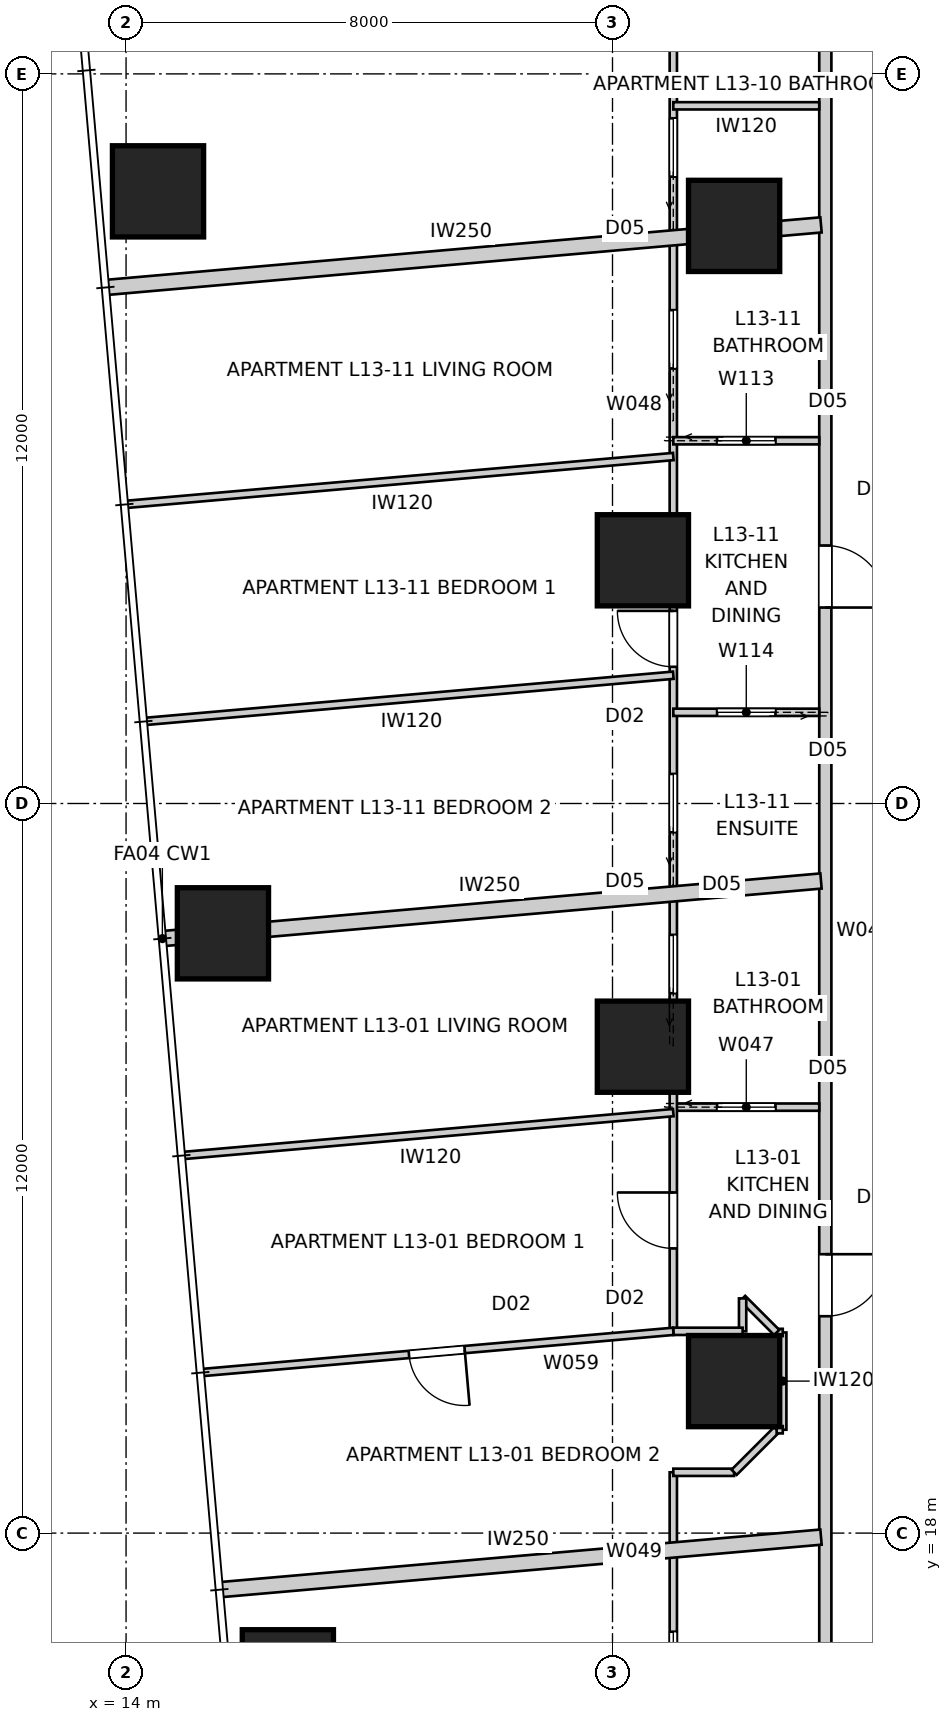
"""IFC4 building model, lengths in metres.
Left out: names, types, materials, properties, quantities, classifications, styles, units other than length and angle.
Written with IfcOpenShell. Run it as: python <this file> out.ifc"""

import sys

from ifc_helpers import new_model, si_unit, direction, frame, frame_2d, origin, origin_2d, place, context, subcontext, project, spatial, rectangle, extrude, element, fill, save


model = new_model("IFC4")
c1 = context("Model", 3, precision=1e-05, world=origin(), true_north=direction((0.0, 1.0)))
c2 = subcontext(c1, "Body", "Model", "MODEL_VIEW")
j1 = project(units=[si_unit("LENGTHUNIT", "METRE"), si_unit("PLANEANGLEUNIT", "RADIAN")], contexts=[c1])
p1 = place(None, origin())
s1 = spatial("IfcSite", under=j1, at=p1, CompositionType="ELEMENT")
p2 = place(p1, origin())
s2 = spatial("IfcBuilding", under=s1, at=p2, CompositionType="ELEMENT")
p3 = place(p2, frame((0.0, 0.0, 50.6)))
s3 = spatial("IfcBuildingStorey", under=s2, at=p3, CompositionType="ELEMENT", Elevation=50.6)
for number, where, z_axis, x_axis in (
    (1, (14.526, 40.068, 0.0), (0.0, 0.0, 1.0), (1.0, 0.0, 0.0)),
    (2, (15.593, 27.865, 0.0), (0.0, 0.0, 1.0), (1.0, 0.0, 0.0)),
    (3, (16.661, 15.661, 0.0), (0.0, 0.0, 1.0), (1.0, 0.0, 0.0)),
    (4, (24.0, 39.5, 0.0), (0.0, 0.0, 1.0), (1.0, 0.0, 0.0)),
    (5, (22.5, 34.0, 0.0), (0.0, 0.0, 1.0), (1.0, 0.0, 0.0)),
    (6, (22.5, 26.0, 0.0), (0.0, 0.0, 1.0), (1.0, 0.0, 0.0)),
    (7, (24.0, 20.5, 0.0), (0.0, 0.0, 1.0), (1.0, 0.0, 0.0)),
):
    element("IfcColumn", number, at=place(p3, frame(where, z_axis=z_axis, x_axis=x_axis)), inside=s3, PredefinedType="COLUMN", context=c2, shape_type="SweptSolid", body=[
        extrude(rectangle(XDim=1.5, YDim=1.5, at=origin_2d()), origin(), (0.0, 0.0, 1.0), 3.4),
    ])
p4 = place(p3, frame((25.5, 43.7, 0.0), z_axis=(0.0, 0.0, 1.0), x_axis=(0.0, -1.0, 0.0)))
e8 = element("IfcWall", 8, at=p4, inside=s3, PredefinedType="PARTITIONING", context=c2, shape_type="SweptSolid", body=[
    extrude(rectangle(XDim=28.2, YDim=0.2, at=frame_2d((14.1, 0.0))), origin(), (0.0, 0.0, 1.0), 3.25),
])
p5 = place(p4, frame((21.113, 0.0, 0.0)))
e9 = element("IfcOpeningElement", 9, at=p5, cuts=e8, PredefinedType="OPENING", context=c2, shape_type="SweptSolid", body=[
    extrude(rectangle(XDim=1.02, YDim=2.34, at=frame_2d((0.51, 1.17))), frame((0.0, 0.11, 0.0), z_axis=(0.0, -1.0, 0.0), x_axis=(1.0, 0.0, 0.0)), (0.0, 0.0, 1.0), 0.22),
])
p6 = place(p4, frame((9.457, 0.0, 0.0)))
e10 = element("IfcOpeningElement", 10, at=p6, cuts=e8, PredefinedType="OPENING", context=c2, shape_type="SweptSolid", body=[
    extrude(rectangle(XDim=1.02, YDim=2.34, at=frame_2d((0.51, 1.17))), frame((0.0, 0.11, 0.0), z_axis=(0.0, -1.0, 0.0), x_axis=(1.0, 0.0, 0.0)), (0.0, 0.0, 1.0), 0.22),
])
p7 = place(p3, frame((13.66, 38.487, 0.0), z_axis=(0.0, 0.0, 1.0), x_axis=(0.996193605338, 0.087168232078, 0.0)))
e11 = element("IfcWall", 11, at=p7, inside=s3, PredefinedType="PARTITIONING", context=c2, shape_type="SweptSolid", body=[
    extrude(rectangle(XDim=11.814, YDim=0.25, at=frame_2d((5.907, 0.0))), origin(), (0.0, 0.0, 1.0), 3.25),
])
p8 = place(p3, frame((15.534, 17.068, 0.0), z_axis=(0.0, 0.0, 1.0), x_axis=(0.996194517831, 0.087157803114, 0.0)))
e12 = element("IfcWall", 12, at=p8, inside=s3, PredefinedType="PARTITIONING", context=c2, shape_type="SweptSolid", body=[
    extrude(rectangle(XDim=9.933, YDim=0.25, at=frame_2d((4.966, 0.0))), origin(), (0.0, 0.0, 1.0), 3.25),
])
p9 = place(p3, frame((14.597, 27.778, 0.0), z_axis=(0.0, 0.0, 1.0), x_axis=(0.996196056792, 0.087140211333, 0.0)))
e13 = element("IfcWall", 13, at=p9, inside=s3, PredefinedType="PARTITIONING", context=c2, shape_type="SweptSolid", body=[
    extrude(rectangle(XDim=10.873, YDim=0.25, at=frame_2d((5.437, 0.0))), origin(), (0.0, 0.0, 1.0), 3.25),
])
p10 = place(p3, frame((23.0, 25.006, 0.0), z_axis=(0.0, 0.0, 1.0), x_axis=(1.0, 0.0, 0.0)))
e14 = element("IfcWall", 14, at=p10, inside=s3, PredefinedType="PARTITIONING", context=c2, shape_type="SweptSolid", body=[
    extrude(rectangle(XDim=2.4, YDim=0.12, at=frame_2d((1.2, 0.0))), origin(), (0.0, 0.0, 1.0), 3.25),
])
p11 = place(p10, frame((0.72, 0.0, 0.0)))
e15 = element("IfcOpeningElement", 15, at=p11, cuts=e14, PredefinedType="OPENING", context=c2, shape_type="SweptSolid", body=[
    extrude(rectangle(XDim=0.96, YDim=2.1, at=frame_2d((0.48, 1.05))), frame((0.0, 0.07, 0.0), z_axis=(0.0, -1.0, 0.0), x_axis=(1.0, 0.0, 0.0)), (0.0, 0.0, 1.0), 0.14),
])
p12 = place(p3, frame((23.0, 21.319, 0.0), z_axis=(0.0, 0.0, 1.0), x_axis=(0.0, 1.0, 0.0)))
e16 = element("IfcWall", 16, at=p12, inside=s3, PredefinedType="PARTITIONING", context=c2, shape_type="SweptSolid", body=[
    extrude(rectangle(XDim=25.681, YDim=0.12, at=frame_2d((12.841, 0.0))), origin(), (0.0, 0.0, 1.0), 2.55),
])
p13 = place(p12, frame((1.364, 0.0, 0.0)))
e17 = element("IfcOpeningElement", 17, at=p13, cuts=e16, PredefinedType="OPENING", context=c2, shape_type="SweptSolid", body=[
    extrude(rectangle(XDim=0.92, YDim=2.34, at=frame_2d((0.46, 1.17))), frame((0.0, 0.07, 0.0), z_axis=(0.0, -1.0, 0.0), x_axis=(1.0, 0.0, 0.0)), (0.0, 0.0, 1.0), 0.14),
])
p14 = place(p12, frame((10.93, 0.0, 0.0)))
e18 = element("IfcOpeningElement", 18, at=p14, cuts=e16, PredefinedType="OPENING", context=c2, shape_type="SweptSolid", body=[
    extrude(rectangle(XDim=0.92, YDim=2.34, at=frame_2d((0.46, 1.17))), frame((0.0, 0.07, 0.0), z_axis=(0.0, -1.0, 0.0), x_axis=(1.0, 0.0, 0.0)), (0.0, 0.0, 1.0), 0.14),
])
p15 = place(p12, frame((22.233, 0.0, 0.0)))
e19 = element("IfcOpeningElement", 19, at=p15, cuts=e16, PredefinedType="OPENING", context=c2, shape_type="SweptSolid", body=[
    extrude(rectangle(XDim=0.92, YDim=2.34, at=frame_2d((0.46, 1.17))), frame((0.0, 0.07, 0.0), z_axis=(0.0, -1.0, 0.0), x_axis=(1.0, 0.0, 0.0)), (0.0, 0.0, 1.0), 0.14),
])
p16 = place(p12, frame((18.991, 0.0, 0.0)))
e20 = element("IfcOpeningElement", 20, at=p16, cuts=e16, PredefinedType="OPENING", context=c2, shape_type="SweptSolid", body=[
    extrude(rectangle(XDim=0.96, YDim=2.1, at=frame_2d((0.48, 1.05))), frame((0.0, 0.07, 0.0), z_axis=(0.0, -1.0, 0.0), x_axis=(1.0, 0.0, 0.0)), (0.0, 0.0, 1.0), 0.14),
])
p17 = place(p12, frame((5.561, 0.0, 0.0)))
e21 = element("IfcOpeningElement", 21, at=p17, cuts=e16, PredefinedType="OPENING", context=c2, shape_type="SweptSolid", body=[
    extrude(rectangle(XDim=0.96, YDim=2.1, at=frame_2d((0.48, 1.05))), frame((0.0, 0.07, 0.0), z_axis=(0.0, -1.0, 0.0), x_axis=(1.0, 0.0, 0.0)), (0.0, 0.0, 1.0), 0.14),
])
p18 = place(p12, frame((15.836, 0.0, 0.0)))
e22 = element("IfcOpeningElement", 22, at=p18, cuts=e16, PredefinedType="OPENING", context=c2, shape_type="SweptSolid", body=[
    extrude(rectangle(XDim=0.96, YDim=2.1, at=frame_2d((0.48, 1.05))), frame((0.0, 0.07, 0.0), z_axis=(0.0, -1.0, 0.0), x_axis=(1.0, 0.0, 0.0)), (0.0, 0.0, 1.0), 0.14),
])
p19 = place(p12, frame((8.208, 0.0, 0.0)))
e23 = element("IfcOpeningElement", 23, at=p19, cuts=e16, PredefinedType="OPENING", context=c2, shape_type="SweptSolid", body=[
    extrude(rectangle(XDim=0.96, YDim=2.1, at=frame_2d((0.48, 1.05))), frame((0.0, 0.07, 0.0), z_axis=(0.0, -1.0, 0.0), x_axis=(1.0, 0.0, 0.0)), (0.0, 0.0, 1.0), 0.14),
])
p20 = place(p3, frame((23.0, 13.0, 0.0), z_axis=(0.0, 0.0, 1.0), x_axis=(0.0, 1.0, 0.0)))
e24 = element("IfcWall", 24, at=p20, inside=s3, PredefinedType="PARTITIONING", context=c2, shape_type="SweptSolid", body=[
    extrude(rectangle(XDim=6.0, YDim=0.12, at=frame_2d((3.0, 0.0))), origin(), (0.0, 0.0, 1.0), 3.25),
])
p21 = place(p20, frame((2.418, 0.0, 0.0)))
e25 = element("IfcOpeningElement", 25, at=p21, cuts=e24, PredefinedType="OPENING", context=c2, shape_type="SweptSolid", body=[
    extrude(rectangle(XDim=0.96, YDim=2.1, at=frame_2d((0.48, 1.05))), frame((0.0, 0.07, 0.0), z_axis=(0.0, -1.0, 0.0), x_axis=(1.0, 0.0, 0.0)), (0.0, 0.0, 1.0), 0.14),
])
p22 = place(p3, frame((23.0, 19.0, 0.0), z_axis=(0.0, 0.0, 1.0), x_axis=(1.0, 0.0, 0.0)))
e26 = element("IfcWall", 26, at=p22, inside=s3, PredefinedType="PARTITIONING", context=c2, shape_type="SweptSolid", body=[
    extrude(rectangle(XDim=1.0, YDim=0.12, at=frame_2d((0.5, 0.0))), origin(), (0.0, 0.0, 1.0), 3.25),
])
p23 = place(p3, frame((24.0, 19.0, 0.0), z_axis=(0.0, 0.0, 1.0), x_axis=(0.707106781187, 0.707106781187, 0.0)))
e27 = element("IfcWall", 27, at=p23, inside=s3, PredefinedType="PARTITIONING", context=c2, shape_type="SweptSolid", body=[
    extrude(rectangle(XDim=0.99, YDim=0.12, at=frame_2d((0.495, 0.0))), origin(), (0.0, 0.0, 1.0), 3.25),
])
p24 = place(p3, frame((24.8, 19.7, 0.0), z_axis=(0.0, 0.0, 1.0), x_axis=(0.0, 1.0, 0.0)))
e28 = element("IfcWall", 28, at=p24, inside=s3, PredefinedType="PARTITIONING", context=c2, shape_type="SweptSolid", body=[
    extrude(rectangle(XDim=1.6, YDim=0.12, at=frame_2d((0.8, 0.0))), origin(), (0.0, 0.0, 1.0), 3.25),
])
p25 = place(p3, frame((24.7, 21.3, 0.0), z_axis=(0.0, 0.0, 1.0), x_axis=(-0.707106781187, 0.707106781187, 0.0)))
e29 = element("IfcWall", 29, at=p25, inside=s3, PredefinedType="PARTITIONING", context=c2, shape_type="SweptSolid", body=[
    extrude(rectangle(XDim=0.792, YDim=0.12, at=frame_2d((0.396, 0.0))), origin(), (0.0, 0.0, 1.0), 3.25),
])
p26 = place(p3, frame((24.14, 21.86, 0.0), z_axis=(0.0, 0.0, 1.0), x_axis=(0.0, -1.0, 0.0)))
e30 = element("IfcWall", 30, at=p26, inside=s3, PredefinedType="PARTITIONING", context=c2, shape_type="SweptSolid", body=[
    extrude(rectangle(XDim=0.542, YDim=0.12, at=frame_2d((0.271, 0.0))), origin(), (0.0, 0.0, 1.0), 3.25),
])
p27 = place(p3, frame((24.14, 21.319, 0.0), z_axis=(0.0, 0.0, 1.0), x_axis=(-1.0, 0.0, 0.0)))
e31 = element("IfcWall", 31, at=p27, inside=s3, PredefinedType="PARTITIONING", context=c2, shape_type="SweptSolid", body=[
    extrude(rectangle(XDim=1.14, YDim=0.12, at=frame_2d((0.57, 0.0))), origin(), (0.0, 0.0, 1.0), 3.25),
])
p28 = place(p3, frame((23.0, 24.916, 0.0), z_axis=(0.0, 0.0, 1.0), x_axis=(-0.99619214338, -0.087184938313, 0.0)))
e32 = element("IfcWall", 32, at=p28, inside=s3, PredefinedType="PARTITIONING", context=c2, shape_type="SweptSolid", body=[
    extrude(rectangle(XDim=8.082, YDim=0.12, at=frame_2d((4.041, 0.0))), origin(), (0.0, 0.0, 1.0), 3.25),
])
p29 = place(p3, frame((23.0, 21.319, 0.0), z_axis=(0.0, 0.0, 1.0), x_axis=(-0.996195047824, -0.0871517452, 0.0)))
e33 = element("IfcWall", 33, at=p29, inside=s3, PredefinedType="PARTITIONING", context=c2, shape_type="SweptSolid", body=[
    extrude(rectangle(XDim=7.768, YDim=0.12, at=frame_2d((3.884, 0.0))), origin(), (0.0, 0.0, 1.0), 3.25),
])
p30 = place(p29, frame((3.444, 0.0, 0.0)))
e34 = element("IfcOpeningElement", 34, at=p30, cuts=e33, PredefinedType="OPENING", context=c2, shape_type="SweptSolid", body=[
    extrude(rectangle(XDim=0.92, YDim=2.34, at=frame_2d((0.46, 1.17))), frame((0.0, 0.07, 0.0), z_axis=(0.0, -1.0, 0.0), x_axis=(1.0, 0.0, 0.0)), (0.0, 0.0, 1.0), 0.14),
])
p31 = place(p3, frame((25.4, 41.475, 0.0), z_axis=(0.0, 0.0, 1.0), x_axis=(-1.0, 0.0, 0.0)))
e35 = element("IfcWall", 35, at=p31, inside=s3, PredefinedType="PARTITIONING", context=c2, shape_type="SweptSolid", body=[
    extrude(rectangle(XDim=2.4, YDim=0.12, at=frame_2d((1.2, 0.0))), origin(), (0.0, 0.0, 1.0), 3.25),
])
p32 = place(p3, frame((23.0, 35.966, 0.0), z_axis=(0.0, 0.0, 1.0), x_axis=(1.0, 0.0, 0.0)))
e36 = element("IfcWall", 36, at=p32, inside=s3, PredefinedType="PARTITIONING", context=c2, shape_type="SweptSolid", body=[
    extrude(rectangle(XDim=2.4, YDim=0.12, at=frame_2d((1.2, 0.0))), origin(), (0.0, 0.0, 1.0), 3.25),
])
p33 = place(p32, frame((0.72, 0.0, 0.0)))
e37 = element("IfcOpeningElement", 37, at=p33, cuts=e36, PredefinedType="OPENING", context=c2, shape_type="SweptSolid", body=[
    extrude(rectangle(XDim=0.96, YDim=2.1, at=frame_2d((0.48, 1.05))), frame((0.0, 0.07, 0.0), z_axis=(0.0, -1.0, 0.0), x_axis=(1.0, 0.0, 0.0)), (0.0, 0.0, 1.0), 0.14),
])
p34 = place(p3, frame((25.4, 31.5, 0.0), z_axis=(0.0, 0.0, 1.0), x_axis=(-1.0, 0.0, 0.0)))
e38 = element("IfcWall", 38, at=p34, inside=s3, PredefinedType="PARTITIONING", context=c2, shape_type="SweptSolid", body=[
    extrude(rectangle(XDim=2.4, YDim=0.12, at=frame_2d((1.2, 0.0))), origin(), (0.0, 0.0, 1.0), 3.25),
])
p35 = place(p34, frame((0.72, 0.0, 0.0)))
e39 = element("IfcOpeningElement", 39, at=p35, cuts=e38, PredefinedType="OPENING", context=c2, shape_type="SweptSolid", body=[
    extrude(rectangle(XDim=0.96, YDim=2.1, at=frame_2d((0.48, 1.05))), frame((0.0, 0.07, 0.0), z_axis=(0.0, -1.0, 0.0), x_axis=(1.0, 0.0, 0.0)), (0.0, 0.0, 1.0), 0.14),
])
p36 = place(p3, frame((23.0, 35.707, 0.0), z_axis=(0.0, 0.0, 1.0), x_axis=(-0.996194246178, -0.087160907995, 0.0)))
e40 = element("IfcWall", 40, at=p36, inside=s3, PredefinedType="PARTITIONING", context=c2, shape_type="SweptSolid", body=[
    extrude(rectangle(XDim=9.022, YDim=0.12, at=frame_2d((4.511, 0.0))), origin(), (0.0, 0.0, 1.0), 3.25),
])
p37 = place(p3, frame((23.0, 32.11, 0.0), z_axis=(0.0, 0.0, 1.0), x_axis=(-0.996194478193, -0.087158256162, 0.0)))
e41 = element("IfcWall", 41, at=p37, inside=s3, PredefinedType="PARTITIONING", context=c2, shape_type="SweptSolid", body=[
    extrude(rectangle(XDim=8.709, YDim=0.12, at=frame_2d((4.354, 0.0))), origin(), (0.0, 0.0, 1.0), 3.25),
])
for number, where, z_axis, x_axis in (
    (42, (24.8, 19.7, 0.0), (0.0, 0.0, 1.0), (-1.0, 0.0, 0.0)),
    (43, (24.8, 21.3, 0.0), (0.0, 0.0, 1.0), (-1.0, 0.0, 0.0)),
):
    element("IfcWall", number, at=place(p3, frame(where, z_axis=z_axis, x_axis=x_axis)), inside=s3, PredefinedType="PARTITIONING", context=c2, shape_type="SweptSolid", body=[
        extrude(rectangle(XDim=0.1, YDim=0.12, at=frame_2d((0.05, 0.0))), origin(), (0.0, 0.0, 1.0), 3.25),
    ])
p38 = place(p5, origin())
e44 = element("IfcDoor", 44, at=p38, inside=s3, OperationType="SINGLE_SWING_LEFT", PredefinedType="DOOR", context=c2, shape_type="SweptSolid", body=[
    extrude(rectangle(XDim=1.02, YDim=2.34, at=frame_2d((0.51, 1.17))), frame((0.0, 0.025, 0.0), z_axis=(0.0, -1.0, 0.0), x_axis=(1.0, 0.0, 0.0)), (0.0, 0.0, 1.0), 0.05),
])
fill(e9, e44)
p39 = place(p6, origin())
e45 = element("IfcDoor", 45, at=p39, inside=s3, OperationType="SINGLE_SWING_RIGHT", PredefinedType="DOOR", context=c2, shape_type="SweptSolid", body=[
    extrude(rectangle(XDim=1.02, YDim=2.34, at=frame_2d((0.51, 1.17))), frame((0.0, 0.025, 0.0), z_axis=(0.0, -1.0, 0.0), x_axis=(1.0, 0.0, 0.0)), (0.0, 0.0, 1.0), 0.05),
])
fill(e10, e45)
p40 = place(p13, origin())
e46 = element("IfcDoor", 46, at=p40, inside=s3, OperationType="SINGLE_SWING_RIGHT", PredefinedType="DOOR", context=c2, shape_type="SweptSolid", body=[
    extrude(rectangle(XDim=0.92, YDim=2.34, at=frame_2d((0.46, 1.17))), frame((0.0, 0.025, 0.0), z_axis=(0.0, -1.0, 0.0), x_axis=(1.0, 0.0, 0.0)), (0.0, 0.0, 1.0), 0.05),
])
fill(e17, e46)
p41 = place(p11, origin())
e47 = element("IfcDoor", 47, at=p41, inside=s3, OperationType="SLIDING_TO_LEFT", PredefinedType="DOOR", context=c2, shape_type="SweptSolid", body=[
    extrude(rectangle(XDim=0.96, YDim=2.1, at=frame_2d((0.48, 1.05))), frame((0.0, 0.025, 0.0), z_axis=(0.0, -1.0, 0.0), x_axis=(1.0, 0.0, 0.0)), (0.0, 0.0, 1.0), 0.05),
])
fill(e15, e47)
p42 = place(p14, origin())
e48 = element("IfcDoor", 48, at=p42, inside=s3, OperationType="SINGLE_SWING_RIGHT", PredefinedType="DOOR", context=c2, shape_type="SweptSolid", body=[
    extrude(rectangle(XDim=0.92, YDim=2.34, at=frame_2d((0.46, 1.17))), frame((0.0, 0.025, 0.0), z_axis=(0.0, -1.0, 0.0), x_axis=(1.0, 0.0, 0.0)), (0.0, 0.0, 1.0), 0.05),
])
fill(e18, e48)
p43 = place(p33, origin())
e49 = element("IfcDoor", 49, at=p43, inside=s3, OperationType="SLIDING_TO_LEFT", PredefinedType="DOOR", context=c2, shape_type="SweptSolid", body=[
    extrude(rectangle(XDim=0.96, YDim=2.1, at=frame_2d((0.48, 1.05))), frame((0.0, 0.025, 0.0), z_axis=(0.0, -1.0, 0.0), x_axis=(1.0, 0.0, 0.0)), (0.0, 0.0, 1.0), 0.05),
])
fill(e37, e49)
p44 = place(p35, origin())
e50 = element("IfcDoor", 50, at=p44, inside=s3, OperationType="SLIDING_TO_LEFT", PredefinedType="DOOR", context=c2, shape_type="SweptSolid", body=[
    extrude(rectangle(XDim=0.96, YDim=2.1, at=frame_2d((0.48, 1.05))), frame((0.0, 0.025, 0.0), z_axis=(0.0, -1.0, 0.0), x_axis=(1.0, 0.0, 0.0)), (0.0, 0.0, 1.0), 0.05),
])
fill(e39, e50)
p45 = place(p16, origin())
e51 = element("IfcDoor", 51, at=p45, inside=s3, OperationType="SLIDING_TO_LEFT", PredefinedType="DOOR", context=c2, shape_type="SweptSolid", body=[
    extrude(rectangle(XDim=0.96, YDim=2.1, at=frame_2d((0.48, 1.05))), frame((0.0, 0.025, 0.0), z_axis=(0.0, -1.0, 0.0), x_axis=(1.0, 0.0, 0.0)), (0.0, 0.0, 1.0), 0.05),
])
fill(e20, e51)
p46 = place(p17, origin())
e52 = element("IfcDoor", 52, at=p46, inside=s3, OperationType="SLIDING_TO_LEFT", PredefinedType="DOOR", context=c2, shape_type="SweptSolid", body=[
    extrude(rectangle(XDim=0.96, YDim=2.1, at=frame_2d((0.48, 1.05))), frame((0.0, 0.025, 0.0), z_axis=(0.0, -1.0, 0.0), x_axis=(1.0, 0.0, 0.0)), (0.0, 0.0, 1.0), 0.05),
])
fill(e21, e52)
p47 = place(p21, origin())
e53 = element("IfcDoor", 53, at=p47, inside=s3, OperationType="SLIDING_TO_LEFT", PredefinedType="DOOR", context=c2, shape_type="SweptSolid", body=[
    extrude(rectangle(XDim=0.96, YDim=2.1, at=frame_2d((0.48, 1.05))), frame((0.0, 0.025, 0.0), z_axis=(0.0, -1.0, 0.0), x_axis=(1.0, 0.0, 0.0)), (0.0, 0.0, 1.0), 0.05),
])
fill(e25, e53)
p48 = place(p18, origin())
e54 = element("IfcDoor", 54, at=p48, inside=s3, OperationType="SLIDING_TO_LEFT", PredefinedType="DOOR", context=c2, shape_type="SweptSolid", body=[
    extrude(rectangle(XDim=0.96, YDim=2.1, at=frame_2d((0.48, 1.05))), frame((0.0, 0.025, 0.0), z_axis=(0.0, -1.0, 0.0), x_axis=(1.0, 0.0, 0.0)), (0.0, 0.0, 1.0), 0.05),
])
fill(e22, e54)
p49 = place(p19, origin())
e55 = element("IfcDoor", 55, at=p49, inside=s3, OperationType="SLIDING_TO_LEFT", PredefinedType="DOOR", context=c2, shape_type="SweptSolid", body=[
    extrude(rectangle(XDim=0.96, YDim=2.1, at=frame_2d((0.48, 1.05))), frame((0.0, 0.025, 0.0), z_axis=(0.0, -1.0, 0.0), x_axis=(1.0, 0.0, 0.0)), (0.0, 0.0, 1.0), 0.05),
])
fill(e23, e55)
p50 = place(p30, origin())
e56 = element("IfcDoor", 56, at=p50, inside=s3, OperationType="SINGLE_SWING_LEFT", PredefinedType="DOOR", context=c2, shape_type="SweptSolid", body=[
    extrude(rectangle(XDim=0.92, YDim=2.34, at=frame_2d((0.46, 1.17))), frame((0.0, 0.025, 0.0), z_axis=(0.0, -1.0, 0.0), x_axis=(1.0, 0.0, 0.0)), (0.0, 0.0, 1.0), 0.05),
])
fill(e34, e56)
save(model, sys.argv[1])
